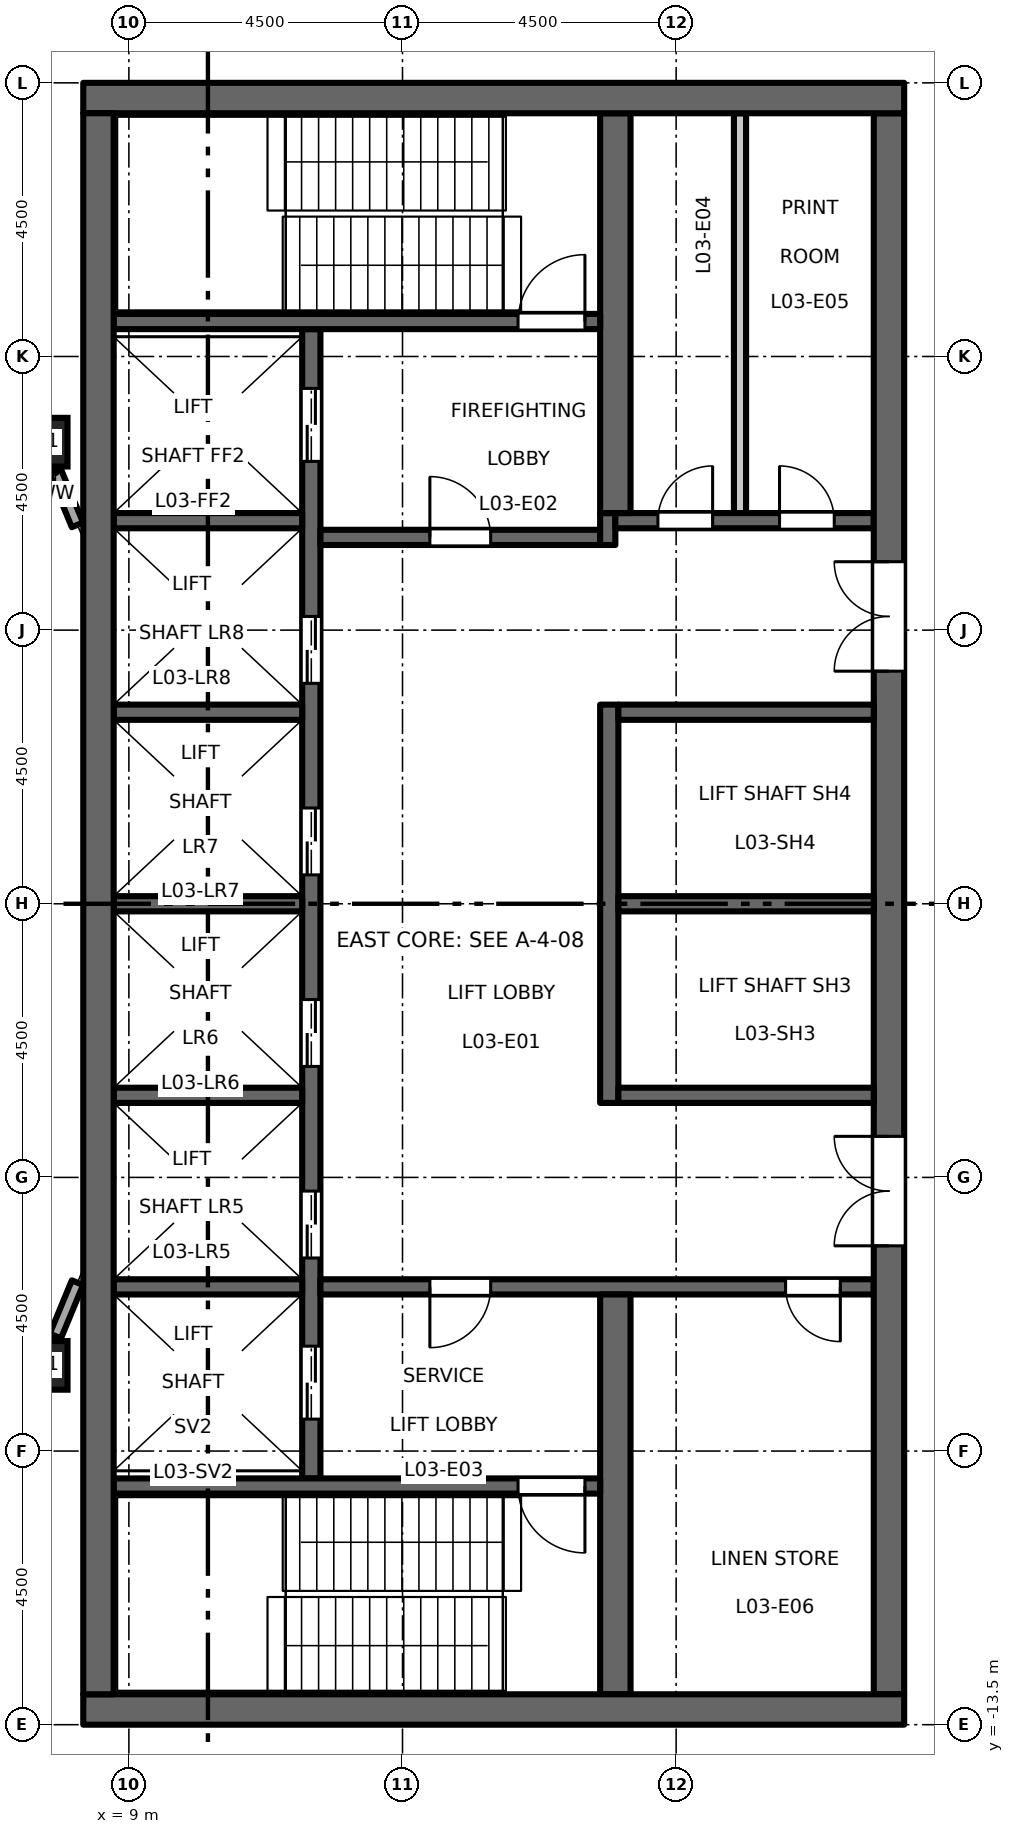
"""IFC4 building model, lengths in metres.
Left out: names, types, materials, properties, quantities, classifications, styles, units other than length and angle.
Written with IfcOpenShell. Run it as: python <this file> out.ifc"""

import sys

from ifc_helpers import new_model, si_unit, direction, frame, frame_2d, origin, origin_2d, place, context, subcontext, project, spatial, rectangle, hollow_rectangle, extrude, element, fill, save


model = new_model("IFC4")
c1 = context("Model", 3, precision=1e-05, world=origin(), true_north=direction((0.0, 1.0)))
c2 = subcontext(c1, "Body", "Model", "MODEL_VIEW")
j1 = project(units=[si_unit("LENGTHUNIT", "METRE"), si_unit("PLANEANGLEUNIT", "RADIAN")], contexts=[c1])
p1 = place(None, origin())
s1 = spatial("IfcSite", under=j1, at=p1, CompositionType="ELEMENT")
p2 = place(p1, origin())
s2 = spatial("IfcBuilding", under=s1, at=p2, CompositionType="ELEMENT")
p3 = place(p2, frame((0.0, 0.0, 17.2)))
s3 = spatial("IfcBuildingStorey", under=s2, at=p3, CompositionType="ELEMENT", Elevation=17.2)
for number, where, z_axis, x_axis in (
    (1, (7.591, -7.591, 0.0), (0.0, 0.0, 1.0), (1.0, 0.0, 0.0)),
    (2, (7.591, 7.591, 0.0), (0.0, 0.0, 1.0), (1.0, 0.0, 0.0)),
):
    element("IfcColumn", number, at=place(p3, frame(where, z_axis=z_axis, x_axis=x_axis)), inside=s3, PredefinedType="COLUMN", context=c2, shape_type="SweptSolid", body=[
        extrude(hollow_rectangle(XDim=0.8, YDim=0.8, WallThickness=0.05, at=origin_2d()), origin(), (0.0, 0.0, 1.0), 5.0),
    ])
p4 = place(p3, frame((12.0, -9.45, 0.0), z_axis=(0.0, 0.0, 1.0), x_axis=(0.0, 1.0, 0.0)))
e3 = element("IfcWall", 3, at=p4, inside=s3, PredefinedType="SHEAR", context=c2, shape_type="SweptSolid", body=[
    extrude(rectangle(XDim=18.9, YDim=0.3, at=frame_2d((9.45, 0.0))), origin(), (0.0, 0.0, 1.0), 4.85),
])
p5 = place(p4, frame((3.625, 0.0, 0.0)))
e4 = element("IfcOpeningElement", 4, at=p5, cuts=e3, PredefinedType="OPENING", context=c2, shape_type="SweptSolid", body=[
    extrude(rectangle(XDim=1.1, YDim=2.1, at=frame_2d((0.55, 1.05))), frame((0.0, 0.16, 0.0), z_axis=(0.0, -1.0, 0.0), x_axis=(1.0, 0.0, 0.0)), (0.0, 0.0, 1.0), 0.32),
])
p6 = place(p4, frame((6.775, 0.0, 0.0)))
e5 = element("IfcOpeningElement", 5, at=p6, cuts=e3, PredefinedType="OPENING", context=c2, shape_type="SweptSolid", body=[
    extrude(rectangle(XDim=1.1, YDim=2.1, at=frame_2d((0.55, 1.05))), frame((0.0, 0.16, 0.0), z_axis=(0.0, -1.0, 0.0), x_axis=(1.0, 0.0, 0.0)), (0.0, 0.0, 1.0), 0.32),
])
p7 = place(p4, frame((9.925, 0.0, 0.0)))
e6 = element("IfcOpeningElement", 6, at=p7, cuts=e3, PredefinedType="OPENING", context=c2, shape_type="SweptSolid", body=[
    extrude(rectangle(XDim=1.1, YDim=2.1, at=frame_2d((0.55, 1.05))), frame((0.0, 0.16, 0.0), z_axis=(0.0, -1.0, 0.0), x_axis=(1.0, 0.0, 0.0)), (0.0, 0.0, 1.0), 0.32),
])
p8 = place(p4, frame((13.075, 0.0, 0.0)))
e7 = element("IfcOpeningElement", 7, at=p8, cuts=e3, PredefinedType="OPENING", context=c2, shape_type="SweptSolid", body=[
    extrude(rectangle(XDim=1.1, YDim=2.1, at=frame_2d((0.55, 1.05))), frame((0.0, 0.16, 0.0), z_axis=(0.0, -1.0, 0.0), x_axis=(1.0, 0.0, 0.0)), (0.0, 0.0, 1.0), 0.32),
])
p9 = place(p4, frame((16.725, 0.0, 0.0)))
e8 = element("IfcOpeningElement", 8, at=p9, cuts=e3, PredefinedType="OPENING", context=c2, shape_type="SweptSolid", body=[
    extrude(rectangle(XDim=1.2, YDim=2.1, at=frame_2d((0.6, 1.05))), frame((0.0, 0.16, 0.0), z_axis=(0.0, -1.0, 0.0), x_axis=(1.0, 0.0, 0.0)), (0.0, 0.0, 1.0), 0.32),
])
p10 = place(p4, frame((0.975, 0.0, 0.0)))
e9 = element("IfcOpeningElement", 9, at=p10, cuts=e3, PredefinedType="OPENING", context=c2, shape_type="SweptSolid", body=[
    extrude(rectangle(XDim=1.2, YDim=2.1, at=frame_2d((0.6, 1.05))), frame((0.0, 0.16, 0.0), z_axis=(0.0, -1.0, 0.0), x_axis=(1.0, 0.0, 0.0)), (0.0, 0.0, 1.0), 0.32),
])
p11 = place(p3, frame((12.15, 6.025, 0.0), z_axis=(0.0, 0.0, 1.0), x_axis=(1.0, 0.0, 0.0)))
e10 = element("IfcWall", 10, at=p11, inside=s3, PredefinedType="SHEAR", context=c2, shape_type="SweptSolid", body=[
    extrude(rectangle(XDim=4.6, YDim=0.25, at=frame_2d((2.3, 0.0))), origin(), (0.0, 0.0, 1.0), 4.85),
])
p12 = place(p11, frame((1.8, 0.0, 0.0)))
e11 = element("IfcOpeningElement", 11, at=p12, cuts=e10, PredefinedType="OPENING", context=c2, shape_type="SweptSolid", body=[
    extrude(rectangle(XDim=1.0, YDim=2.1, at=frame_2d((0.5, 1.05))), frame((0.0, 0.135, 0.0), z_axis=(0.0, -1.0, 0.0), x_axis=(1.0, 0.0, 0.0)), (0.0, 0.0, 1.0), 0.27),
])
p13 = place(p3, frame((16.875, 5.9, 0.0), z_axis=(0.0, 0.0, 1.0), x_axis=(0.0, 1.0, 0.0)))
e12 = element("IfcWall", 12, at=p13, inside=s3, PredefinedType="SHEAR", context=c2, shape_type="SweptSolid", body=[
    extrude(rectangle(XDim=0.525, YDim=0.25, at=frame_2d((0.263, 0.0))), origin(), (0.0, 0.0, 1.0), 4.85),
])
p14 = place(p3, frame((17.0, 6.3, 0.0), z_axis=(0.0, 0.0, 1.0), x_axis=(1.0, 0.0, 0.0)))
e13 = element("IfcWall", 13, at=p14, inside=s3, PredefinedType="SHEAR", context=c2, shape_type="SweptSolid", body=[
    extrude(rectangle(XDim=4.25, YDim=0.25, at=frame_2d((2.125, 0.0))), origin(), (0.0, 0.0, 1.0), 4.85),
])
p15 = place(p14, frame((0.7, 0.0, 0.0)))
e14 = element("IfcOpeningElement", 14, at=p15, cuts=e13, PredefinedType="OPENING", context=c2, shape_type="SweptSolid", body=[
    extrude(rectangle(XDim=0.9, YDim=2.1, at=frame_2d((0.45, 1.05))), frame((0.0, 0.135, 0.0), z_axis=(0.0, -1.0, 0.0), x_axis=(1.0, 0.0, 0.0)), (0.0, 0.0, 1.0), 0.27),
])
p16 = place(p14, frame((2.7, 0.0, 0.0)))
e15 = element("IfcOpeningElement", 15, at=p16, cuts=e13, PredefinedType="OPENING", context=c2, shape_type="SweptSolid", body=[
    extrude(rectangle(XDim=0.9, YDim=2.1, at=frame_2d((0.45, 1.05))), frame((0.0, 0.135, 0.0), z_axis=(0.0, -1.0, 0.0), x_axis=(1.0, 0.0, 0.0)), (0.0, 0.0, 1.0), 0.27),
])
p17 = place(p3, frame((12.15, -6.3, 0.0), z_axis=(0.0, 0.0, 1.0), x_axis=(1.0, 0.0, 0.0)))
e16 = element("IfcWall", 16, at=p17, inside=s3, PredefinedType="SHEAR", context=c2, shape_type="SweptSolid", body=[
    extrude(rectangle(XDim=9.1, YDim=0.25, at=frame_2d((4.55, 0.0))), origin(), (0.0, 0.0, 1.0), 4.85),
])
p18 = place(p17, frame((1.8, 0.0, 0.0)))
e17 = element("IfcOpeningElement", 17, at=p18, cuts=e16, PredefinedType="OPENING", context=c2, shape_type="SweptSolid", body=[
    extrude(rectangle(XDim=1.0, YDim=2.1, at=frame_2d((0.5, 1.05))), frame((0.0, 0.135, 0.0), z_axis=(0.0, -1.0, 0.0), x_axis=(1.0, 0.0, 0.0)), (0.0, 0.0, 1.0), 0.27),
])
p19 = place(p17, frame((7.65, 0.0, 0.0)))
e18 = element("IfcOpeningElement", 18, at=p19, cuts=e16, PredefinedType="OPENING", context=c2, shape_type="SweptSolid", body=[
    extrude(rectangle(XDim=0.9, YDim=2.1, at=frame_2d((0.45, 1.05))), frame((0.0, 0.135, 0.0), z_axis=(0.0, -1.0, 0.0), x_axis=(1.0, 0.0, 0.0)), (0.0, 0.0, 1.0), 0.27),
])
p20 = place(p3, frame((21.5, -13.0, 0.0), z_axis=(0.0, 0.0, 1.0), x_axis=(0.0, 1.0, 0.0)))
e19 = element("IfcWall", 19, at=p20, inside=s3, PredefinedType="SHEAR", context=c2, shape_type="SweptSolid", body=[
    extrude(rectangle(XDim=26.0, YDim=0.5, at=frame_2d((13.0, 0.0))), origin(), (0.0, 0.0, 1.0), 4.85),
])
p21 = place(p20, frame((16.825, 0.0, 0.0)))
e20 = element("IfcOpeningElement", 20, at=p21, cuts=e19, PredefinedType="OPENING", context=c2, shape_type="SweptSolid", body=[
    extrude(rectangle(XDim=1.8, YDim=2.1, at=frame_2d((0.9, 1.05))), frame((0.0, 0.26, 0.0), z_axis=(0.0, -1.0, 0.0), x_axis=(1.0, 0.0, 0.0)), (0.0, 0.0, 1.0), 0.52),
])
p22 = place(p20, frame((7.375, 0.0, 0.0)))
e21 = element("IfcOpeningElement", 21, at=p22, cuts=e19, PredefinedType="OPENING", context=c2, shape_type="SweptSolid", body=[
    extrude(rectangle(XDim=1.8, YDim=2.1, at=frame_2d((0.9, 1.05))), frame((0.0, 0.26, 0.0), z_axis=(0.0, -1.0, 0.0), x_axis=(1.0, 0.0, 0.0)), (0.0, 0.0, 1.0), 0.52),
])
p23 = place(p3, frame((19.05, 6.425, 0.0), z_axis=(0.0, 0.0, 1.0), x_axis=(0.0, 1.0, 0.0)))
e22 = element("IfcWall", 22, at=p23, inside=s3, PredefinedType="PARTITIONING", context=c2, shape_type="SweptSolid", body=[
    extrude(rectangle(XDim=6.575, YDim=0.2, at=frame_2d((3.288, 0.0))), origin(), (0.0, 0.0, 1.0), 4.85),
])
p24 = place(p3, frame((16.9, -3.275, 0.0), z_axis=(0.0, 0.0, 1.0), x_axis=(0.0, 1.0, 0.0)))
e23 = element("IfcWall", 23, at=p24, inside=s3, PredefinedType="SHEAR", context=c2, shape_type="SweptSolid", body=[
    extrude(rectangle(XDim=6.55, YDim=0.3, at=frame_2d((3.275, 0.0))), origin(), (0.0, 0.0, 1.0), 4.85),
])
for number, where, z_axis, x_axis in (
    (24, (17.05, 0.0, 0.0), (0.0, 0.0, 1.0), (1.0, 0.0, 0.0)),
    (25, (17.05, 3.15, 0.0), (0.0, 0.0, 1.0), (1.0, 0.0, 0.0)),
    (26, (17.05, -3.15, 0.0), (0.0, 0.0, 1.0), (1.0, 0.0, 0.0)),
):
    element("IfcWall", number, at=place(p3, frame(where, z_axis=z_axis, x_axis=x_axis)), inside=s3, PredefinedType="SHEAR", context=c2, shape_type="SweptSolid", body=[
        extrude(rectangle(XDim=4.2, YDim=0.25, at=frame_2d((2.1, 0.0))), origin(), (0.0, 0.0, 1.0), 4.85),
    ])
for number, where, z_axis, x_axis in (
    (27, (17.0, 6.425, 0.0), (0.0, 0.0, 1.0), (0.0, 1.0, 0.0)),
    (28, (17.0, -13.0, 0.0), (0.0, 0.0, 1.0), (0.0, 1.0, 0.0)),
):
    element("IfcWall", number, at=place(p3, frame(where, z_axis=z_axis, x_axis=x_axis)), inside=s3, PredefinedType="SHEAR", context=c2, shape_type="SweptSolid", body=[
        extrude(rectangle(XDim=6.575, YDim=0.5, at=frame_2d((3.288, 0.0))), origin(), (0.0, 0.0, 1.0), 4.85),
    ])
for number, where, z_axis, x_axis in (
    (29, (8.75, 0.0, 0.0), (0.0, 0.0, 1.0), (1.0, 0.0, 0.0)),
    (30, (8.75, 3.15, 0.0), (0.0, 0.0, 1.0), (1.0, 0.0, 0.0)),
    (31, (8.75, 6.3, 0.0), (0.0, 0.0, 1.0), (1.0, 0.0, 0.0)),
    (32, (8.75, -3.15, 0.0), (0.0, 0.0, 1.0), (1.0, 0.0, 0.0)),
    (33, (8.75, -6.3, 0.0), (0.0, 0.0, 1.0), (1.0, 0.0, 0.0)),
):
    element("IfcWall", number, at=place(p3, frame(where, z_axis=z_axis, x_axis=x_axis)), inside=s3, PredefinedType="SHEAR", context=c2, shape_type="SweptSolid", body=[
        extrude(rectangle(XDim=3.1, YDim=0.25, at=frame_2d((1.55, 0.0))), origin(), (0.0, 0.0, 1.0), 4.85),
    ])
p25 = place(p3, frame((8.75, 9.575, 0.0), z_axis=(0.0, 0.0, 1.0), x_axis=(1.0, 0.0, 0.0)))
e34 = element("IfcWall", 34, at=p25, inside=s3, PredefinedType="SHEAR", context=c2, shape_type="SweptSolid", body=[
    extrude(rectangle(XDim=8.0, YDim=0.25, at=frame_2d((4.0, 0.0))), origin(), (0.0, 0.0, 1.0), 4.85),
])
p26 = place(p25, frame((6.65, 0.0, 0.0)))
e35 = element("IfcOpeningElement", 35, at=p26, cuts=e34, PredefinedType="OPENING", context=c2, shape_type="SweptSolid", body=[
    extrude(rectangle(XDim=1.1, YDim=2.1, at=frame_2d((0.55, 1.05))), frame((0.0, 0.135, 0.0), z_axis=(0.0, -1.0, 0.0), x_axis=(1.0, 0.0, 0.0)), (0.0, 0.0, 1.0), 0.27),
])
p27 = place(p3, frame((8.75, -9.575, 0.0), z_axis=(0.0, 0.0, 1.0), x_axis=(1.0, 0.0, 0.0)))
e36 = element("IfcWall", 36, at=p27, inside=s3, PredefinedType="SHEAR", context=c2, shape_type="SweptSolid", body=[
    extrude(rectangle(XDim=8.0, YDim=0.25, at=frame_2d((4.0, 0.0))), origin(), (0.0, 0.0, 1.0), 4.85),
])
p28 = place(p27, frame((6.65, 0.0, 0.0)))
e37 = element("IfcOpeningElement", 37, at=p28, cuts=e36, PredefinedType="OPENING", context=c2, shape_type="SweptSolid", body=[
    extrude(rectangle(XDim=1.1, YDim=2.1, at=frame_2d((0.55, 1.05))), frame((0.0, 0.135, 0.0), z_axis=(0.0, -1.0, 0.0), x_axis=(1.0, 0.0, 0.0)), (0.0, 0.0, 1.0), 0.27),
])
for number, where, z_axis, x_axis in (
    (38, (8.25, 13.25, 0.0), (0.0, 0.0, 1.0), (1.0, 0.0, 0.0)),
    (39, (8.25, -13.25, 0.0), (0.0, 0.0, 1.0), (1.0, 0.0, 0.0)),
):
    element("IfcWall", number, at=place(p3, frame(where, z_axis=z_axis, x_axis=x_axis)), inside=s3, PredefinedType="SHEAR", context=c2, shape_type="SweptSolid", body=[
        extrude(rectangle(XDim=13.5, YDim=0.5, at=frame_2d((6.75, 0.0))), origin(), (0.0, 0.0, 1.0), 4.85),
    ])
p29 = place(p3, frame((8.5, -13.0, 0.0), z_axis=(0.0, 0.0, 1.0), x_axis=(0.0, 1.0, 0.0)))
e40 = element("IfcWall", 40, at=p29, inside=s3, PredefinedType="SHEAR", context=c2, shape_type="SweptSolid", body=[
    extrude(rectangle(XDim=26.0, YDim=0.5, at=frame_2d((13.0, 0.0))), origin(), (0.0, 0.0, 1.0), 4.85),
])
for number, where, z_axis, x_axis in (
    (41, (7.791, -7.108, 0.0), (0.0, 0.0, 1.0), (0.383, 0.924, 0.0)),
    (42, (8.154, 6.231, 0.0), (0.0, 0.0, 1.0), (-0.383, 0.924, 0.0)),
):
    element("IfcWall", number, at=place(p3, frame(where, z_axis=z_axis, x_axis=x_axis)), inside=s3, PredefinedType="STANDARD", context=c2, shape_type="SweptSolid", body=[
        extrude(rectangle(XDim=0.949, YDim=0.2, at=frame_2d((0.475, 0.0))), origin(), (0.0, 0.0, 1.0), 4.23),
    ])
p30 = place(p12, origin())
e43 = element("IfcDoor", 43, at=p30, inside=s3, OperationType="SINGLE_SWING_RIGHT", PredefinedType="DOOR", context=c2, shape_type="SweptSolid", body=[
    extrude(rectangle(XDim=1.0, YDim=2.1, at=frame_2d((0.5, 1.05))), frame((0.0, 0.025, 0.0), z_axis=(0.0, -1.0, 0.0), x_axis=(1.0, 0.0, 0.0)), (0.0, 0.0, 1.0), 0.05),
])
fill(e11, e43)
p31 = place(p18, origin())
e44 = element("IfcDoor", 44, at=p31, inside=s3, OperationType="SINGLE_SWING_LEFT", PredefinedType="DOOR", context=c2, shape_type="SweptSolid", body=[
    extrude(rectangle(XDim=1.0, YDim=2.1, at=frame_2d((0.5, 1.05))), frame((0.0, 0.025, 0.0), z_axis=(0.0, -1.0, 0.0), x_axis=(1.0, 0.0, 0.0)), (0.0, 0.0, 1.0), 0.05),
])
fill(e17, e44)
p32 = place(p26, origin())
e45 = element("IfcDoor", 45, at=p32, inside=s3, OperationType="SINGLE_SWING_LEFT", PredefinedType="DOOR", context=c2, shape_type="SweptSolid", body=[
    extrude(rectangle(XDim=1.1, YDim=2.1, at=frame_2d((0.55, 1.05))), frame((0.0, 0.025, 0.0), z_axis=(0.0, -1.0, 0.0), x_axis=(1.0, 0.0, 0.0)), (0.0, 0.0, 1.0), 0.05),
])
fill(e35, e45)
p33 = place(p28, origin())
e46 = element("IfcDoor", 46, at=p33, inside=s3, OperationType="SINGLE_SWING_RIGHT", PredefinedType="DOOR", context=c2, shape_type="SweptSolid", body=[
    extrude(rectangle(XDim=1.1, YDim=2.1, at=frame_2d((0.55, 1.05))), frame((0.0, 0.025, 0.0), z_axis=(0.0, -1.0, 0.0), x_axis=(1.0, 0.0, 0.0)), (0.0, 0.0, 1.0), 0.05),
])
fill(e37, e46)
p34 = place(p21, origin())
e47 = element("IfcDoor", 47, at=p34, inside=s3, OperationType="DOUBLE_DOOR_DOUBLE_SWING", PredefinedType="DOOR", context=c2, shape_type="SweptSolid", body=[
    extrude(rectangle(XDim=1.8, YDim=2.1, at=frame_2d((0.9, 1.05))), frame((0.0, 0.025, 0.0), z_axis=(0.0, -1.0, 0.0), x_axis=(1.0, 0.0, 0.0)), (0.0, 0.0, 1.0), 0.05),
])
fill(e20, e47)
p35 = place(p22, origin())
e48 = element("IfcDoor", 48, at=p35, inside=s3, OperationType="DOUBLE_DOOR_DOUBLE_SWING", PredefinedType="DOOR", context=c2, shape_type="SweptSolid", body=[
    extrude(rectangle(XDim=1.8, YDim=2.1, at=frame_2d((0.9, 1.05))), frame((0.0, 0.025, 0.0), z_axis=(0.0, -1.0, 0.0), x_axis=(1.0, 0.0, 0.0)), (0.0, 0.0, 1.0), 0.05),
])
fill(e21, e48)
p36 = place(p5, origin())
e49 = element("IfcDoor", 49, at=p36, inside=s3, OperationType="DOUBLE_DOOR_SLIDING", PredefinedType="DOOR", context=c2, shape_type="SweptSolid", body=[
    extrude(rectangle(XDim=1.1, YDim=2.1, at=frame_2d((0.55, 1.05))), frame((0.0, 0.025, 0.0), z_axis=(0.0, -1.0, 0.0), x_axis=(1.0, 0.0, 0.0)), (0.0, 0.0, 1.0), 0.05),
])
fill(e4, e49)
p37 = place(p6, origin())
e50 = element("IfcDoor", 50, at=p37, inside=s3, OperationType="DOUBLE_DOOR_SLIDING", PredefinedType="DOOR", context=c2, shape_type="SweptSolid", body=[
    extrude(rectangle(XDim=1.1, YDim=2.1, at=frame_2d((0.55, 1.05))), frame((0.0, 0.025, 0.0), z_axis=(0.0, -1.0, 0.0), x_axis=(1.0, 0.0, 0.0)), (0.0, 0.0, 1.0), 0.05),
])
fill(e5, e50)
p38 = place(p7, origin())
e51 = element("IfcDoor", 51, at=p38, inside=s3, OperationType="DOUBLE_DOOR_SLIDING", PredefinedType="DOOR", context=c2, shape_type="SweptSolid", body=[
    extrude(rectangle(XDim=1.1, YDim=2.1, at=frame_2d((0.55, 1.05))), frame((0.0, 0.025, 0.0), z_axis=(0.0, -1.0, 0.0), x_axis=(1.0, 0.0, 0.0)), (0.0, 0.0, 1.0), 0.05),
])
fill(e6, e51)
p39 = place(p8, origin())
e52 = element("IfcDoor", 52, at=p39, inside=s3, OperationType="DOUBLE_DOOR_SLIDING", PredefinedType="DOOR", context=c2, shape_type="SweptSolid", body=[
    extrude(rectangle(XDim=1.1, YDim=2.1, at=frame_2d((0.55, 1.05))), frame((0.0, 0.025, 0.0), z_axis=(0.0, -1.0, 0.0), x_axis=(1.0, 0.0, 0.0)), (0.0, 0.0, 1.0), 0.05),
])
fill(e7, e52)
p40 = place(p9, origin())
e53 = element("IfcDoor", 53, at=p40, inside=s3, OperationType="DOUBLE_DOOR_SLIDING", PredefinedType="DOOR", context=c2, shape_type="SweptSolid", body=[
    extrude(rectangle(XDim=1.2, YDim=2.1, at=frame_2d((0.6, 1.05))), frame((0.0, 0.025, 0.0), z_axis=(0.0, -1.0, 0.0), x_axis=(1.0, 0.0, 0.0)), (0.0, 0.0, 1.0), 0.05),
])
fill(e8, e53)
p41 = place(p10, origin())
e54 = element("IfcDoor", 54, at=p41, inside=s3, OperationType="DOUBLE_DOOR_SLIDING", PredefinedType="DOOR", context=c2, shape_type="SweptSolid", body=[
    extrude(rectangle(XDim=1.2, YDim=2.1, at=frame_2d((0.6, 1.05))), frame((0.0, 0.025, 0.0), z_axis=(0.0, -1.0, 0.0), x_axis=(1.0, 0.0, 0.0)), (0.0, 0.0, 1.0), 0.05),
])
fill(e9, e54)
p42 = place(p15, origin())
e55 = element("IfcDoor", 55, at=p42, inside=s3, OperationType="SINGLE_SWING_LEFT", PredefinedType="DOOR", context=c2, shape_type="SweptSolid", body=[
    extrude(rectangle(XDim=0.9, YDim=2.1, at=frame_2d((0.45, 1.05))), frame((0.0, 0.025, 0.0), z_axis=(0.0, -1.0, 0.0), x_axis=(1.0, 0.0, 0.0)), (0.0, 0.0, 1.0), 0.05),
])
fill(e14, e55)
p43 = place(p16, origin())
e56 = element("IfcDoor", 56, at=p43, inside=s3, OperationType="SINGLE_SWING_RIGHT", PredefinedType="DOOR", context=c2, shape_type="SweptSolid", body=[
    extrude(rectangle(XDim=0.9, YDim=2.1, at=frame_2d((0.45, 1.05))), frame((0.0, 0.025, 0.0), z_axis=(0.0, -1.0, 0.0), x_axis=(1.0, 0.0, 0.0)), (0.0, 0.0, 1.0), 0.05),
])
fill(e15, e56)
p44 = place(p19, origin())
e57 = element("IfcDoor", 57, at=p44, inside=s3, OperationType="SINGLE_SWING_RIGHT", PredefinedType="DOOR", context=c2, shape_type="SweptSolid", body=[
    extrude(rectangle(XDim=0.9, YDim=2.1, at=frame_2d((0.45, 1.05))), frame((0.0, 0.025, 0.0), z_axis=(0.0, -1.0, 0.0), x_axis=(1.0, 0.0, 0.0)), (0.0, 0.0, 1.0), 0.05),
])
fill(e18, e57)
save(model, sys.argv[1])
